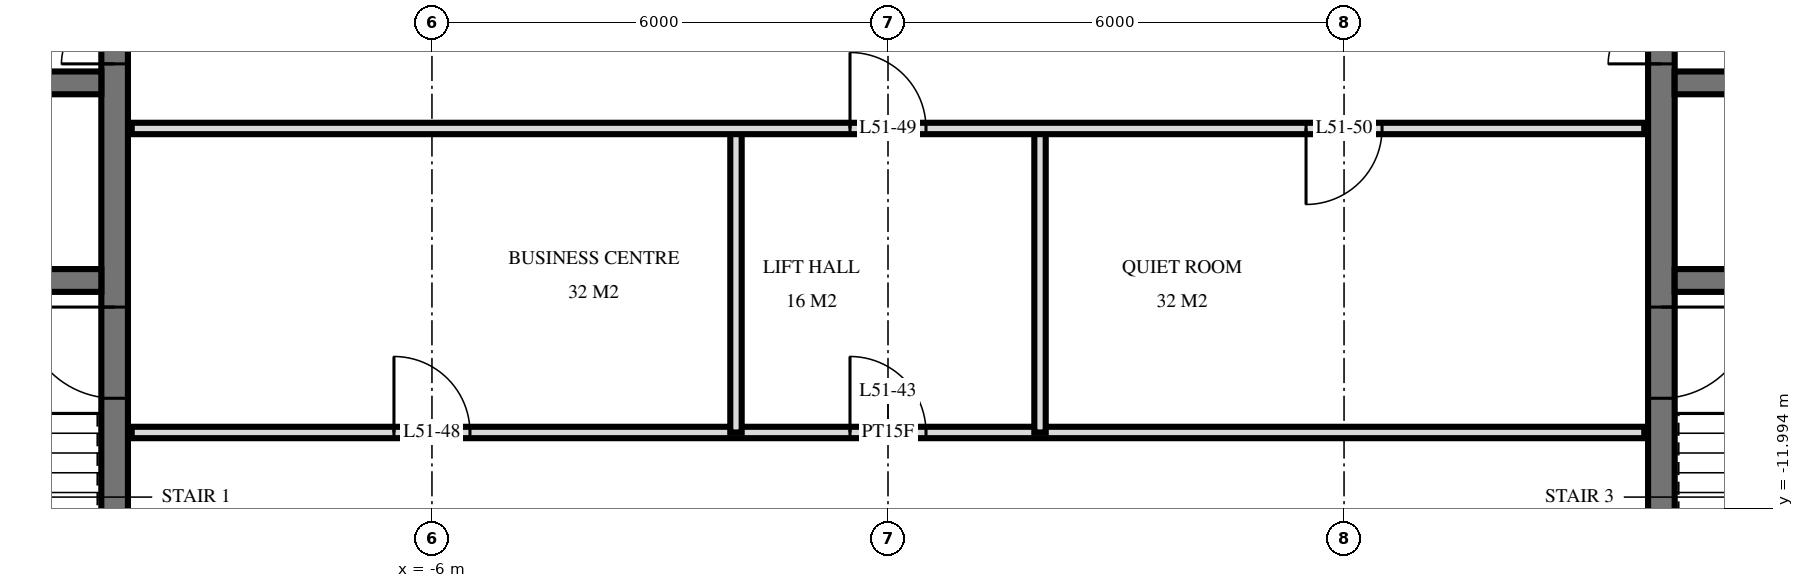
"""IFC4 building model, lengths in metres.
Left out: names, types, materials, properties, quantities, classifications, styles, units other than length and angle.
Written with IfcOpenShell. Run it as: python <this file> out.ifc"""

import sys

from ifc_helpers import new_model, si_unit, direction, frame, frame_2d, origin, place, context, subcontext, project, spatial, rectangle, extrude, element, fill, save


model = new_model("IFC4")
c1 = context("Model", 3, precision=1e-05, world=origin(), true_north=direction((0.0, 1.0)))
c2 = subcontext(c1, "Body", "Model", "MODEL_VIEW")
j1 = project(units=[si_unit("LENGTHUNIT", "METRE"), si_unit("PLANEANGLEUNIT", "RADIAN")], contexts=[c1])
p1 = place(None, origin())
s1 = spatial("IfcSite", under=j1, at=p1, CompositionType="ELEMENT")
p2 = place(p1, origin())
s2 = spatial("IfcBuilding", under=s1, at=p2, CompositionType="ELEMENT")
p3 = place(p2, frame((0.0, 0.0, 197.6)))
s3 = spatial("IfcBuildingStorey", under=s2, at=p3, CompositionType="ELEMENT", Elevation=197.6)
p4 = place(p3, frame((-10.175, -14.55, 0.0), z_axis=(0.0, 0.0, 1.0), x_axis=(0.0, 1.0, 0.0)))
e1 = element("IfcWall", 1, at=p4, inside=s3, PredefinedType="SHEAR", context=c2, shape_type="SweptSolid", body=[
    extrude(rectangle(XDim=14.1, YDim=0.35, at=frame_2d((7.05, 0.0))), origin(), (0.0, 0.0, 1.0), 3.5),
])
p5 = place(p4, frame((8.4, 0.0, 0.0)))
e2 = element("IfcOpeningElement", 2, at=p5, cuts=e1, PredefinedType="OPENING", context=c2, shape_type="SweptSolid", body=[
    extrude(rectangle(XDim=1.4, YDim=2.4, at=frame_2d((0.7, 1.2))), frame((0.0, 0.185, 0.0), z_axis=(0.0, -1.0, 0.0), x_axis=(1.0, 0.0, 0.0)), (0.0, 0.0, 1.0), 0.37),
])
p6 = place(p4, frame((10.0, 0.0, 0.0)))
e3 = element("IfcOpeningElement", 3, at=p6, cuts=e1, PredefinedType="OPENING", context=c2, shape_type="SweptSolid", body=[
    extrude(rectangle(XDim=1.4, YDim=2.4, at=frame_2d((0.7, 1.2))), frame((0.0, 0.185, 0.0), z_axis=(0.0, -1.0, 0.0), x_axis=(1.0, 0.0, 0.0)), (0.0, 0.0, 1.0), 0.37),
])
p7 = place(p4, frame((4.0, 0.0, 0.0)))
e4 = element("IfcOpeningElement", 4, at=p7, cuts=e1, PredefinedType="OPENING", context=c2, shape_type="SweptSolid", body=[
    extrude(rectangle(XDim=1.2, YDim=2.1, at=frame_2d((0.6, 1.05))), frame((0.0, 0.185, 0.0), z_axis=(0.0, -1.0, 0.0), x_axis=(1.0, 0.0, 0.0)), (0.0, 0.0, 1.0), 0.37),
])
p8 = place(p3, frame((-24.05, -6.4, 0.0), z_axis=(0.0, 0.0, 1.0), x_axis=(1.0, 0.0, 0.0)))
e5 = element("IfcWall", 5, at=p8, inside=s3, PredefinedType="SHEAR", context=c2, shape_type="SweptSolid", body=[
    extrude(rectangle(XDim=13.7, YDim=0.3, at=frame_2d((6.85, 0.0))), origin(), (0.0, 0.0, 1.0), 3.5),
])
p9 = place(p8, frame((0.55, 0.0, 0.0)))
e6 = element("IfcOpeningElement", 6, at=p9, cuts=e5, PredefinedType="OPENING", context=c2, shape_type="SweptSolid", body=[
    extrude(rectangle(XDim=1.1, YDim=2.1, at=frame_2d((0.55, 1.05))), frame((0.0, 0.16, 0.0), z_axis=(0.0, -1.0, 0.0), x_axis=(1.0, 0.0, 0.0)), (0.0, 0.0, 1.0), 0.32),
])
p10 = place(p8, frame((5.8, 0.0, 0.0)))
e7 = element("IfcOpeningElement", 7, at=p10, cuts=e5, PredefinedType="OPENING", context=c2, shape_type="SweptSolid", body=[
    extrude(rectangle(XDim=1.1, YDim=2.1, at=frame_2d((0.55, 1.05))), frame((0.0, 0.16, 0.0), z_axis=(0.0, -1.0, 0.0), x_axis=(1.0, 0.0, 0.0)), (0.0, 0.0, 1.0), 0.32),
])
p11 = place(p3, frame((-24.05, -9.0, 0.0), z_axis=(0.0, 0.0, 1.0), x_axis=(1.0, 0.0, 0.0)))
e8 = element("IfcWall", 8, at=p11, inside=s3, PredefinedType="SHEAR", context=c2, shape_type="SweptSolid", body=[
    extrude(rectangle(XDim=13.7, YDim=0.3, at=frame_2d((6.85, 0.0))), origin(), (0.0, 0.0, 1.0), 3.5),
])
p12 = place(p11, frame((8.8, 0.0, 0.0)))
e9 = element("IfcOpeningElement", 9, at=p12, cuts=e8, PredefinedType="OPENING", context=c2, shape_type="SweptSolid", body=[
    extrude(rectangle(XDim=1.1, YDim=2.1, at=frame_2d((0.55, 1.05))), frame((0.0, 0.16, 0.0), z_axis=(0.0, -1.0, 0.0), x_axis=(1.0, 0.0, 0.0)), (0.0, 0.0, 1.0), 0.32),
])
p13 = place(p3, frame((10.175, -14.55, 0.0), z_axis=(0.0, 0.0, 1.0), x_axis=(0.0, 1.0, 0.0)))
e10 = element("IfcWall", 10, at=p13, inside=s3, PredefinedType="SHEAR", context=c2, shape_type="SweptSolid", body=[
    extrude(rectangle(XDim=14.1, YDim=0.35, at=frame_2d((7.05, 0.0))), origin(), (0.0, 0.0, 1.0), 3.5),
])
p14 = place(p13, frame((8.4, 0.0, 0.0)))
e11 = element("IfcOpeningElement", 11, at=p14, cuts=e10, PredefinedType="OPENING", context=c2, shape_type="SweptSolid", body=[
    extrude(rectangle(XDim=1.4, YDim=2.4, at=frame_2d((0.7, 1.2))), frame((0.0, 0.185, 0.0), z_axis=(0.0, -1.0, 0.0), x_axis=(1.0, 0.0, 0.0)), (0.0, 0.0, 1.0), 0.37),
])
p15 = place(p13, frame((10.0, 0.0, 0.0)))
e12 = element("IfcOpeningElement", 12, at=p15, cuts=e10, PredefinedType="OPENING", context=c2, shape_type="SweptSolid", body=[
    extrude(rectangle(XDim=1.4, YDim=2.4, at=frame_2d((0.7, 1.2))), frame((0.0, 0.185, 0.0), z_axis=(0.0, -1.0, 0.0), x_axis=(1.0, 0.0, 0.0)), (0.0, 0.0, 1.0), 0.37),
])
p16 = place(p13, frame((4.0, 0.0, 0.0)))
e13 = element("IfcOpeningElement", 13, at=p16, cuts=e10, PredefinedType="OPENING", context=c2, shape_type="SweptSolid", body=[
    extrude(rectangle(XDim=1.2, YDim=2.1, at=frame_2d((0.6, 1.05))), frame((0.0, 0.185, 0.0), z_axis=(0.0, -1.0, 0.0), x_axis=(1.0, 0.0, 0.0)), (0.0, 0.0, 1.0), 0.37),
])
p17 = place(p3, frame((10.35, -6.4, 0.0), z_axis=(0.0, 0.0, 1.0), x_axis=(1.0, 0.0, 0.0)))
e14 = element("IfcWall", 14, at=p17, inside=s3, PredefinedType="SHEAR", context=c2, shape_type="SweptSolid", body=[
    extrude(rectangle(XDim=13.7, YDim=0.3, at=frame_2d((6.85, 0.0))), origin(), (0.0, 0.0, 1.0), 3.5),
])
p18 = place(p17, frame((12.05, 0.0, 0.0)))
e15 = element("IfcOpeningElement", 15, at=p18, cuts=e14, PredefinedType="OPENING", context=c2, shape_type="SweptSolid", body=[
    extrude(rectangle(XDim=1.1, YDim=2.1, at=frame_2d((0.55, 1.05))), frame((0.0, 0.16, 0.0), z_axis=(0.0, -1.0, 0.0), x_axis=(1.0, 0.0, 0.0)), (0.0, 0.0, 1.0), 0.32),
])
p19 = place(p17, frame((6.8, 0.0, 0.0)))
e16 = element("IfcOpeningElement", 16, at=p19, cuts=e14, PredefinedType="OPENING", context=c2, shape_type="SweptSolid", body=[
    extrude(rectangle(XDim=1.1, YDim=2.1, at=frame_2d((0.55, 1.05))), frame((0.0, 0.16, 0.0), z_axis=(0.0, -1.0, 0.0), x_axis=(1.0, 0.0, 0.0)), (0.0, 0.0, 1.0), 0.32),
])
p20 = place(p3, frame((10.35, -9.0, 0.0), z_axis=(0.0, 0.0, 1.0), x_axis=(1.0, 0.0, 0.0)))
e17 = element("IfcWall", 17, at=p20, inside=s3, PredefinedType="SHEAR", context=c2, shape_type="SweptSolid", body=[
    extrude(rectangle(XDim=13.7, YDim=0.3, at=frame_2d((6.85, 0.0))), origin(), (0.0, 0.0, 1.0), 3.5),
])
p21 = place(p20, frame((3.8, 0.0, 0.0)))
e18 = element("IfcOpeningElement", 18, at=p21, cuts=e17, PredefinedType="OPENING", context=c2, shape_type="SweptSolid", body=[
    extrude(rectangle(XDim=1.1, YDim=2.1, at=frame_2d((0.55, 1.05))), frame((0.0, 0.16, 0.0), z_axis=(0.0, -1.0, 0.0), x_axis=(1.0, 0.0, 0.0)), (0.0, 0.0, 1.0), 0.32),
])
for number, where, z_axis, x_axis in (
    (19, (2.0, -11.0, 0.0), (0.0, 0.0, 1.0), (0.0, 1.0, 0.0)),
    (20, (-2.0, -11.0, 0.0), (0.0, 0.0, 1.0), (0.0, 1.0, 0.0)),
):
    element("IfcWall", number, at=place(p3, frame(where, z_axis=z_axis, x_axis=x_axis)), inside=s3, PredefinedType="PARTITIONING", context=c2, shape_type="SweptSolid", body=[
        extrude(rectangle(XDim=4.0, YDim=0.15, at=frame_2d((2.0, 0.0))), origin(), (0.0, 0.0, 1.0), 3.22),
    ])
p22 = place(p3, frame((-9.95, -11.0, 0.0), z_axis=(0.0, 0.0, 1.0), x_axis=(1.0, 0.0, 0.0)))
e21 = element("IfcWall", 21, at=p22, inside=s3, PredefinedType="PARTITIONING", context=c2, shape_type="SweptSolid", body=[
    extrude(rectangle(XDim=19.9, YDim=0.15, at=frame_2d((9.95, 0.0))), origin(), (0.0, 0.0, 1.0), 3.22),
])
p23 = place(p22, frame((9.45, 0.0, 0.0)))
e22 = element("IfcOpeningElement", 22, at=p23, cuts=e21, PredefinedType="OPENING", context=c2, shape_type="SweptSolid", body=[
    extrude(rectangle(XDim=1.0, YDim=2.1, at=frame_2d((0.5, 1.05))), frame((0.0, 0.085, 0.0), z_axis=(0.0, -1.0, 0.0), x_axis=(1.0, 0.0, 0.0)), (0.0, 0.0, 1.0), 0.17),
])
p24 = place(p22, frame((3.45, 0.0, 0.0)))
e23 = element("IfcOpeningElement", 23, at=p24, cuts=e21, PredefinedType="OPENING", context=c2, shape_type="SweptSolid", body=[
    extrude(rectangle(XDim=1.0, YDim=2.1, at=frame_2d((0.5, 1.05))), frame((0.0, 0.085, 0.0), z_axis=(0.0, -1.0, 0.0), x_axis=(1.0, 0.0, 0.0)), (0.0, 0.0, 1.0), 0.17),
])
p25 = place(p3, frame((-9.95, -7.0, 0.0), z_axis=(0.0, 0.0, 1.0), x_axis=(1.0, 0.0, 0.0)))
e24 = element("IfcWall", 24, at=p25, inside=s3, PredefinedType="PARTITIONING", context=c2, shape_type="SweptSolid", body=[
    extrude(rectangle(XDim=19.9, YDim=0.15, at=frame_2d((9.95, 0.0))), origin(), (0.0, 0.0, 1.0), 3.22),
])
p26 = place(p25, frame((9.45, 0.0, 0.0)))
e25 = element("IfcOpeningElement", 25, at=p26, cuts=e24, PredefinedType="OPENING", context=c2, shape_type="SweptSolid", body=[
    extrude(rectangle(XDim=1.0, YDim=2.1, at=frame_2d((0.5, 1.05))), frame((0.0, 0.085, 0.0), z_axis=(0.0, -1.0, 0.0), x_axis=(1.0, 0.0, 0.0)), (0.0, 0.0, 1.0), 0.17),
])
p27 = place(p25, frame((15.45, 0.0, 0.0)))
e26 = element("IfcOpeningElement", 26, at=p27, cuts=e24, PredefinedType="OPENING", context=c2, shape_type="SweptSolid", body=[
    extrude(rectangle(XDim=1.0, YDim=2.1, at=frame_2d((0.5, 1.05))), frame((0.0, 0.085, 0.0), z_axis=(0.0, -1.0, 0.0), x_axis=(1.0, 0.0, 0.0)), (0.0, 0.0, 1.0), 0.17),
])
p28 = place(p5, origin())
e27 = element("IfcDoor", 27, at=p28, inside=s3, OperationType="DOUBLE_DOOR_SINGLE_SWING", PredefinedType="DOOR", context=c2, shape_type="SweptSolid", body=[
    extrude(rectangle(XDim=1.4, YDim=2.4, at=frame_2d((0.7, 1.2))), frame((0.0, 0.025, 0.0), z_axis=(0.0, -1.0, 0.0), x_axis=(1.0, 0.0, 0.0)), (0.0, 0.0, 1.0), 0.05),
])
fill(e2, e27)
p29 = place(p7, origin())
e28 = element("IfcDoor", 28, at=p29, inside=s3, OperationType="SINGLE_SWING_LEFT", PredefinedType="DOOR", context=c2, shape_type="SweptSolid", body=[
    extrude(rectangle(XDim=1.2, YDim=2.1, at=frame_2d((0.6, 1.05))), frame((0.0, 0.025, 0.0), z_axis=(0.0, -1.0, 0.0), x_axis=(1.0, 0.0, 0.0)), (0.0, 0.0, 1.0), 0.05),
])
fill(e4, e28)
p30 = place(p14, origin())
e29 = element("IfcDoor", 29, at=p30, inside=s3, OperationType="DOUBLE_DOOR_SINGLE_SWING", PredefinedType="DOOR", context=c2, shape_type="SweptSolid", body=[
    extrude(rectangle(XDim=1.4, YDim=2.4, at=frame_2d((0.7, 1.2))), frame((0.0, 0.025, 0.0), z_axis=(0.0, -1.0, 0.0), x_axis=(1.0, 0.0, 0.0)), (0.0, 0.0, 1.0), 0.05),
])
fill(e11, e29)
p31 = place(p16, frame((0.6, 0.0, 0.0), z_axis=(0.0, 0.0, 1.0), x_axis=(-1.0, 0.0, 0.0)))
e30 = element("IfcDoor", 30, at=p31, inside=s3, OperationType="SINGLE_SWING_RIGHT", PredefinedType="DOOR", context=c2, shape_type="SweptSolid", body=[
    extrude(rectangle(XDim=1.2, YDim=2.1, at=frame_2d((0.0, 1.05))), frame((0.0, -0.025, 0.0), z_axis=(0.0, 1.0, 0.0), x_axis=(-1.0, 0.0, 0.0)), (0.0, 0.0, 1.0), 0.05),
])
fill(e13, e30)
p32 = place(p23, origin())
e31 = element("IfcDoor", 31, at=p32, inside=s3, OperationType="SINGLE_SWING_RIGHT", PredefinedType="DOOR", context=c2, shape_type="SweptSolid", body=[
    extrude(rectangle(XDim=1.0, YDim=2.1, at=frame_2d((0.5, 1.05))), frame((0.0, 0.025, 0.0), z_axis=(0.0, -1.0, 0.0), x_axis=(1.0, 0.0, 0.0)), (0.0, 0.0, 1.0), 0.05),
])
fill(e22, e31)
p33 = place(p24, origin())
e32 = element("IfcDoor", 32, at=p33, inside=s3, OperationType="SINGLE_SWING_RIGHT", PredefinedType="DOOR", context=c2, shape_type="SweptSolid", body=[
    extrude(rectangle(XDim=1.0, YDim=2.1, at=frame_2d((0.5, 1.05))), frame((0.0, 0.025, 0.0), z_axis=(0.0, -1.0, 0.0), x_axis=(1.0, 0.0, 0.0)), (0.0, 0.0, 1.0), 0.05),
])
fill(e23, e32)
p34 = place(p26, origin())
e33 = element("IfcDoor", 33, at=p34, inside=s3, OperationType="SINGLE_SWING_RIGHT", PredefinedType="DOOR", context=c2, shape_type="SweptSolid", body=[
    extrude(rectangle(XDim=1.0, YDim=2.1, at=frame_2d((0.5, 1.05))), frame((0.0, 0.025, 0.0), z_axis=(0.0, -1.0, 0.0), x_axis=(1.0, 0.0, 0.0)), (0.0, 0.0, 1.0), 0.05),
])
fill(e25, e33)
p35 = place(p27, frame((0.5, 0.0, 0.0), z_axis=(0.0, 0.0, 1.0), x_axis=(-1.0, 0.0, 0.0)))
e34 = element("IfcDoor", 34, at=p35, inside=s3, OperationType="SINGLE_SWING_LEFT", PredefinedType="DOOR", context=c2, shape_type="SweptSolid", body=[
    extrude(rectangle(XDim=1.0, YDim=2.1, at=frame_2d((0.0, 1.05))), frame((0.0, -0.025, 0.0), z_axis=(0.0, 1.0, 0.0), x_axis=(-1.0, 0.0, 0.0)), (0.0, 0.0, 1.0), 0.05),
])
fill(e26, e34)
save(model, sys.argv[1])
